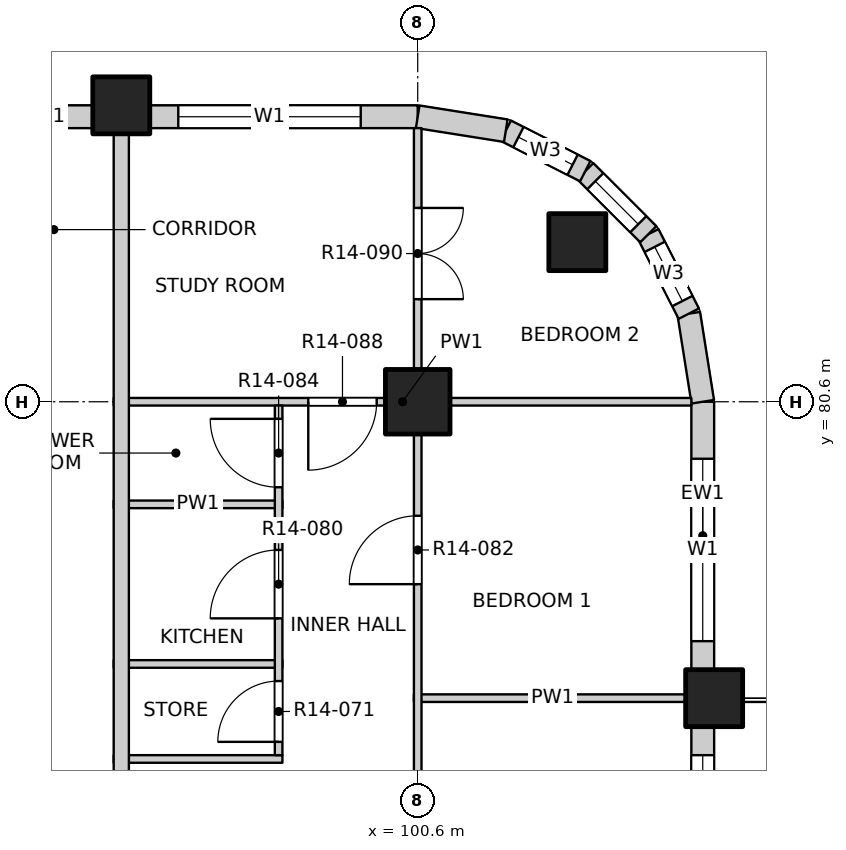
"""IFC4 building model, lengths in metres.
Left out: names, types, materials, properties, quantities, classifications, styles, units other than length and angle.
Written with IfcOpenShell. Run it as: python <this file> out.ifc"""

import sys

from ifc_helpers import new_model, si_unit, direction, frame, frame_2d, origin, origin_2d, place, context, subcontext, project, spatial, rectangle, extrude, element, fill, save


model = new_model("IFC4")
c1 = context("Model", 3, precision=1e-05, world=origin(), true_north=direction((0.0, 1.0)))
c2 = subcontext(c1, "Body", "Model", "MODEL_VIEW")
j1 = project(units=[si_unit("LENGTHUNIT", "METRE"), si_unit("PLANEANGLEUNIT", "RADIAN")], contexts=[c1])
p1 = place(None, origin())
s1 = spatial("IfcSite", under=j1, at=p1, CompositionType="ELEMENT")
p2 = place(p1, origin())
s2 = spatial("IfcBuilding", under=s1, at=p2, CompositionType="ELEMENT")
p3 = place(p2, frame((0.0, 0.0, 155.4)))
s3 = spatial("IfcBuildingStorey", under=s2, at=p3, CompositionType="ELEMENT", Elevation=155.4)
for number, where, z_axis, x_axis in (
    (1, (102.7, 82.7, -0.25), (0.0, 0.0, 1.0), (1.0, 0.0, 0.0)),
    (2, (104.5, 76.7, -0.25), (0.0, 0.0, 1.0), (1.0, 0.0, 0.0)),
    (3, (96.7, 84.5, -0.25), (0.0, 0.0, 1.0), (1.0, 0.0, 0.0)),
):
    element("IfcColumn", number, at=place(p3, frame(where, z_axis=z_axis, x_axis=x_axis)), inside=s3, PredefinedType="COLUMN", context=c2, shape_type="SweptSolid", body=[
        extrude(rectangle(XDim=0.75, YDim=0.75, at=origin_2d()), origin(), (0.0, 0.0, 1.0), 3.4),
    ])
p4 = place(p3, frame((100.6, 80.6, -0.25), z_axis=(0.0, 0.0, 1.0), x_axis=(1.0, 0.0, 0.0)))
e4 = element("IfcColumn", 4, at=p4, inside=s3, PredefinedType="COLUMN", context=c2, shape_type="SweptSolid", body=[
    extrude(rectangle(XDim=0.85, YDim=0.85, at=origin_2d()), origin(), (0.0, 0.0, 1.0), 3.4),
])
p5 = place(p3, frame((104.35, 69.275, 0.0), z_axis=(0.0, 0.0, 1.0), x_axis=(0.0, 1.0, 0.0)))
e5 = element("IfcWall", 5, at=p5, inside=s3, PredefinedType="SOLIDWALL", context=c2, shape_type="SweptSolid", body=[
    extrude(rectangle(XDim=7.05, YDim=0.3, at=frame_2d((3.525, 0.0))), origin(), (0.0, 0.0, 1.0), 2.7),
])
p6 = place(p5, frame((0.675, 0.0, 0.0)))
e6 = element("IfcOpeningElement", 6, at=p6, cuts=e5, PredefinedType="OPENING", context=c2, shape_type="SweptSolid", body=[
    extrude(rectangle(XDim=1.8, YDim=2.4, at=frame_2d((0.9, 1.2))), frame((0.0, 0.16, 0.0), z_axis=(0.0, -1.0, 0.0), x_axis=(1.0, 0.0, 0.0)), (0.0, 0.0, 1.0), 0.32),
])
p7 = place(p5, frame((4.275, 0.0, 0.9)))
e7 = element("IfcOpeningElement", 7, at=p7, cuts=e5, PredefinedType="OPENING", context=c2, shape_type="SweptSolid", body=[
    extrude(rectangle(XDim=2.4, YDim=1.8, at=frame_2d((1.2, 0.9))), frame((0.0, 0.16, 0.0), z_axis=(0.0, -1.0, 0.0), x_axis=(1.0, 0.0, 0.0)), (0.0, 0.0, 1.0), 0.32),
])
p8 = place(p3, frame((104.35, 77.075, 0.0), z_axis=(0.0, 0.0, 1.0), x_axis=(0.0, 1.0, 0.0)))
e8 = element("IfcWall", 8, at=p8, inside=s3, PredefinedType="SOLIDWALL", context=c2, shape_type="SweptSolid", body=[
    extrude(rectangle(XDim=3.525, YDim=0.3, at=frame_2d((1.763, 0.0))), origin(), (0.0, 0.0, 1.0), 2.7),
])
p9 = place(p8, frame((0.375, 0.0, 0.9)))
e9 = element("IfcOpeningElement", 9, at=p9, cuts=e8, PredefinedType="OPENING", context=c2, shape_type="SweptSolid", body=[
    extrude(rectangle(XDim=2.4, YDim=1.8, at=frame_2d((1.2, 0.9))), frame((0.0, 0.16, 0.0), z_axis=(0.0, -1.0, 0.0), x_axis=(1.0, 0.0, 0.0)), (0.0, 0.0, 1.0), 0.32),
])
p10 = place(p3, frame((95.025, 84.35, 0.0), z_axis=(0.0, 0.0, 1.0), x_axis=(1.0, 0.0, 0.0)))
e10 = element("IfcWall", 10, at=p10, inside=s3, PredefinedType="SOLIDWALL", context=c2, shape_type="SweptSolid", body=[
    extrude(rectangle(XDim=1.3, YDim=0.3, at=frame_2d((0.65, 0.0))), origin(), (0.0, 0.0, 1.0), 2.7),
])
p11 = place(p3, frame((97.075, 84.35, 0.0), z_axis=(0.0, 0.0, 1.0), x_axis=(1.0, 0.0, 0.0)))
e11 = element("IfcWall", 11, at=p11, inside=s3, PredefinedType="SOLIDWALL", context=c2, shape_type="SweptSolid", body=[
    extrude(rectangle(XDim=3.525, YDim=0.3, at=frame_2d((1.763, 0.0))), origin(), (0.0, 0.0, 1.0), 2.7),
])
p12 = place(p11, frame((0.375, 0.0, 0.9)))
e12 = element("IfcOpeningElement", 12, at=p12, cuts=e11, PredefinedType="OPENING", context=c2, shape_type="SweptSolid", body=[
    extrude(rectangle(XDim=2.4, YDim=1.8, at=frame_2d((1.2, 0.9))), frame((0.0, 0.16, 0.0), z_axis=(0.0, -1.0, 0.0), x_axis=(1.0, 0.0, 0.0)), (0.0, 0.0, 1.0), 0.32),
])
p13 = place(p3, frame((104.35, 80.6, 0.0), z_axis=(0.0, 0.0, 1.0), x_axis=(-0.156496880861, 0.987678452879, 0.0)))
e13 = element("IfcWall", 13, at=p13, inside=s3, PredefinedType="SOLIDWALL", context=c2, shape_type="SweptSolid", body=[
    extrude(rectangle(XDim=1.173, YDim=0.3, at=frame_2d((0.586, 0.0))), origin(), (0.0, 0.0, 1.0), 2.7),
])
p14 = place(p3, frame((104.167, 81.759, 0.0), z_axis=(0.0, 0.0, 1.0), x_axis=(-0.454025524128, 0.890988677504, 0.0)))
e14 = element("IfcWall", 14, at=p14, inside=s3, PredefinedType="SOLIDWALL", context=c2, shape_type="SweptSolid", body=[
    extrude(rectangle(XDim=1.173, YDim=0.3, at=frame_2d((0.587, 0.0))), origin(), (0.0, 0.0, 1.0), 2.7),
])
p15 = place(p14, frame((0.187, 0.0, 0.9)))
e15 = element("IfcOpeningElement", 15, at=p15, cuts=e14, PredefinedType="OPENING", context=c2, shape_type="SweptSolid", body=[
    extrude(rectangle(XDim=0.8, YDim=1.2, at=frame_2d((0.4, 0.6))), frame((0.0, 0.16, 0.0), z_axis=(0.0, -1.0, 0.0), x_axis=(1.0, 0.0, 0.0)), (0.0, 0.0, 1.0), 0.32),
])
p16 = place(p3, frame((103.634, 82.804, 0.0), z_axis=(0.0, 0.0, 1.0), x_axis=(-0.707106781187, 0.707106781187, 0.0)))
e16 = element("IfcWall", 16, at=p16, inside=s3, PredefinedType="SOLIDWALL", context=c2, shape_type="SweptSolid", body=[
    extrude(rectangle(XDim=1.173, YDim=0.3, at=frame_2d((0.586, 0.0))), origin(), (0.0, 0.0, 1.0), 2.7),
])
p17 = place(p16, frame((0.187, 0.0, 0.9)))
e17 = element("IfcOpeningElement", 17, at=p17, cuts=e16, PredefinedType="OPENING", context=c2, shape_type="SweptSolid", body=[
    extrude(rectangle(XDim=0.8, YDim=1.2, at=frame_2d((0.4, 0.6))), frame((0.0, 0.16, 0.0), z_axis=(0.0, -1.0, 0.0), x_axis=(1.0, 0.0, 0.0)), (0.0, 0.0, 1.0), 0.32),
])
p18 = place(p3, frame((102.804, 83.634, 0.0), z_axis=(0.0, 0.0, 1.0), x_axis=(-0.890988677504, 0.454025524128, 0.0)))
e18 = element("IfcWall", 18, at=p18, inside=s3, PredefinedType="SOLIDWALL", context=c2, shape_type="SweptSolid", body=[
    extrude(rectangle(XDim=1.173, YDim=0.3, at=frame_2d((0.587, 0.0))), origin(), (0.0, 0.0, 1.0), 2.7),
])
p19 = place(p18, frame((0.187, 0.0, 0.9)))
e19 = element("IfcOpeningElement", 19, at=p19, cuts=e18, PredefinedType="OPENING", context=c2, shape_type="SweptSolid", body=[
    extrude(rectangle(XDim=0.8, YDim=1.2, at=frame_2d((0.4, 0.6))), frame((0.0, 0.16, 0.0), z_axis=(0.0, -1.0, 0.0), x_axis=(1.0, 0.0, 0.0)), (0.0, 0.0, 1.0), 0.32),
])
p20 = place(p3, frame((101.759, 84.167, 0.0), z_axis=(0.0, 0.0, 1.0), x_axis=(-0.987678452879, 0.156496880861, 0.0)))
e20 = element("IfcWall", 20, at=p20, inside=s3, PredefinedType="SOLIDWALL", context=c2, shape_type="SweptSolid", body=[
    extrude(rectangle(XDim=1.173, YDim=0.3, at=frame_2d((0.586, 0.0))), origin(), (0.0, 0.0, 1.0), 2.7),
])
p21 = place(p3, frame((96.6, 75.9, 0.0), z_axis=(0.0, 0.0, 1.0), x_axis=(1.0, 0.0, 0.0)))
e21 = element("IfcWall", 21, at=p21, inside=s3, PredefinedType="PARTITIONING", context=c2, shape_type="SweptSolid", body=[
    extrude(rectangle(XDim=2.22, YDim=0.1, at=frame_2d((1.11, 0.0))), origin(), (0.0, 0.0, 1.0), 3.15),
])
p22 = place(p3, frame((100.55, 76.7, 0.0), z_axis=(0.0, 0.0, 1.0), x_axis=(1.0, 0.0, 0.0)))
e22 = element("IfcWall", 22, at=p22, inside=s3, PredefinedType="PARTITIONING", context=c2, shape_type="SweptSolid", body=[
    extrude(rectangle(XDim=3.65, YDim=0.1, at=frame_2d((1.825, 0.0))), origin(), (0.0, 0.0, 1.0), 2.55),
])
for number, where, z_axis, x_axis in (
    (23, (96.6, 77.15, 0.0), (0.0, 0.0, 1.0), (1.0, 0.0, 0.0)),
    (24, (96.6, 79.25, 0.0), (0.0, 0.0, 1.0), (1.0, 0.0, 0.0)),
):
    element("IfcWall", number, at=place(p3, frame(where, z_axis=z_axis, x_axis=x_axis)), inside=s3, PredefinedType="PARTITIONING", context=c2, shape_type="SweptSolid", body=[
        extrude(rectangle(XDim=2.22, YDim=0.1, at=frame_2d((1.11, 0.0))), origin(), (0.0, 0.0, 1.0), 3.15),
    ])
p23 = place(p3, frame((96.6, 80.6, 0.0), z_axis=(0.0, 0.0, 1.0), x_axis=(1.0, 0.0, 0.0)))
e25 = element("IfcWall", 25, at=p23, inside=s3, PredefinedType="PARTITIONING", context=c2, shape_type="SweptSolid", body=[
    extrude(rectangle(XDim=7.6, YDim=0.1, at=frame_2d((3.8, 0.0))), origin(), (0.0, 0.0, 1.0), 3.15),
])
p24 = place(p23, frame((2.56, 0.0, 0.0)))
e26 = element("IfcOpeningElement", 26, at=p24, cuts=e25, PredefinedType="OPENING", context=c2, shape_type="SweptSolid", body=[
    extrude(rectangle(XDim=0.9, YDim=2.1, at=frame_2d((0.45, 1.05))), frame((0.0, 0.06, 0.0), z_axis=(0.0, -1.0, 0.0), x_axis=(1.0, 0.0, 0.0)), (0.0, 0.0, 1.0), 0.12),
])
p25 = place(p3, frame((96.7, 49.5, 0.0), z_axis=(0.0, 0.0, 1.0), x_axis=(0.0, 1.0, 0.0)))
e27 = element("IfcWall", 27, at=p25, inside=s3, PredefinedType="PARTITIONING", context=c2, shape_type="SweptSolid", body=[
    extrude(rectangle(XDim=34.7, YDim=0.2, at=frame_2d((17.35, 0.0))), origin(), (0.0, 0.0, 1.0), 3.15),
])
p26 = place(p25, frame((3.225, 0.0, 0.0)))
e28 = element("IfcOpeningElement", 28, at=p26, cuts=e27, PredefinedType="OPENING", context=c2, shape_type="SweptSolid", body=[
    extrude(rectangle(XDim=1.0, YDim=2.1, at=frame_2d((0.5, 1.05))), frame((0.0, 0.11, 0.0), z_axis=(0.0, -1.0, 0.0), x_axis=(1.0, 0.0, 0.0)), (0.0, 0.0, 1.0), 0.22),
])
p27 = place(p25, frame((19.775, 0.0, 0.0)))
e29 = element("IfcOpeningElement", 29, at=p27, cuts=e27, PredefinedType="OPENING", context=c2, shape_type="SweptSolid", body=[
    extrude(rectangle(XDim=1.0, YDim=2.1, at=frame_2d((0.5, 1.05))), frame((0.0, 0.11, 0.0), z_axis=(0.0, -1.0, 0.0), x_axis=(1.0, 0.0, 0.0)), (0.0, 0.0, 1.0), 0.22),
])
p28 = place(p25, frame((24.125, 0.0, 0.0)))
e30 = element("IfcOpeningElement", 30, at=p28, cuts=e27, PredefinedType="OPENING", context=c2, shape_type="SweptSolid", body=[
    extrude(rectangle(XDim=1.0, YDim=2.1, at=frame_2d((0.5, 1.05))), frame((0.0, 0.11, 0.0), z_axis=(0.0, -1.0, 0.0), x_axis=(1.0, 0.0, 0.0)), (0.0, 0.0, 1.0), 0.22),
])
p29 = place(p3, frame((98.77, 75.95, 0.0), z_axis=(0.0, 0.0, 1.0), x_axis=(0.0, 1.0, 0.0)))
e31 = element("IfcWall", 31, at=p29, inside=s3, PredefinedType="PARTITIONING", context=c2, shape_type="SweptSolid", body=[
    extrude(rectangle(XDim=4.6, YDim=0.1, at=frame_2d((2.3, 0.0))), origin(), (0.0, 0.0, 1.0), 3.15),
])
p30 = place(p29, frame((0.175, 0.0, 0.0)))
e32 = element("IfcOpeningElement", 32, at=p30, cuts=e31, PredefinedType="OPENING", context=c2, shape_type="SweptSolid", body=[
    extrude(rectangle(XDim=0.8, YDim=2.1, at=frame_2d((0.4, 1.05))), frame((0.0, 0.06, 0.0), z_axis=(0.0, -1.0, 0.0), x_axis=(1.0, 0.0, 0.0)), (0.0, 0.0, 1.0), 0.12),
])
p31 = place(p29, frame((1.8, 0.0, 0.0)))
e33 = element("IfcOpeningElement", 33, at=p31, cuts=e31, PredefinedType="OPENING", context=c2, shape_type="SweptSolid", body=[
    extrude(rectangle(XDim=0.9, YDim=2.1, at=frame_2d((0.45, 1.05))), frame((0.0, 0.06, 0.0), z_axis=(0.0, -1.0, 0.0), x_axis=(1.0, 0.0, 0.0)), (0.0, 0.0, 1.0), 0.12),
])
p32 = place(p29, frame((3.525, 0.0, 0.0)))
e34 = element("IfcOpeningElement", 34, at=p32, cuts=e31, PredefinedType="OPENING", context=c2, shape_type="SweptSolid", body=[
    extrude(rectangle(XDim=0.9, YDim=2.1, at=frame_2d((0.45, 1.05))), frame((0.0, 0.06, 0.0), z_axis=(0.0, -1.0, 0.0), x_axis=(1.0, 0.0, 0.0)), (0.0, 0.0, 1.0), 0.12),
])
p33 = place(p3, frame((100.6, 45.8, 0.0), z_axis=(0.0, 0.0, 1.0), x_axis=(0.0, 1.0, 0.0)))
e35 = element("IfcWall", 35, at=p33, inside=s3, PredefinedType="PARTITIONING", context=c2, shape_type="SweptSolid", body=[
    extrude(rectangle(XDim=38.4, YDim=0.1, at=frame_2d((19.2, 0.0))), origin(), (0.0, 0.0, 1.0), 3.15),
])
p34 = place(p33, frame((1.05, 0.0, 0.0)))
e36 = element("IfcOpeningElement", 36, at=p34, cuts=e35, PredefinedType="OPENING", context=c2, shape_type="SweptSolid", body=[
    extrude(rectangle(XDim=1.2, YDim=2.1, at=frame_2d((0.6, 1.05))), frame((0.0, 0.06, 0.0), z_axis=(0.0, -1.0, 0.0), x_axis=(1.0, 0.0, 0.0)), (0.0, 0.0, 1.0), 0.12),
])
p35 = place(p33, frame((5.1, 0.0, 0.0)))
e37 = element("IfcOpeningElement", 37, at=p35, cuts=e35, PredefinedType="OPENING", context=c2, shape_type="SweptSolid", body=[
    extrude(rectangle(XDim=0.9, YDim=2.1, at=frame_2d((0.45, 1.05))), frame((0.0, 0.06, 0.0), z_axis=(0.0, -1.0, 0.0), x_axis=(1.0, 0.0, 0.0)), (0.0, 0.0, 1.0), 0.12),
])
p36 = place(p33, frame((9.0, 0.0, 0.0)))
e38 = element("IfcOpeningElement", 38, at=p36, cuts=e35, PredefinedType="OPENING", context=c2, shape_type="SweptSolid", body=[
    extrude(rectangle(XDim=0.9, YDim=2.1, at=frame_2d((0.45, 1.05))), frame((0.0, 0.06, 0.0), z_axis=(0.0, -1.0, 0.0), x_axis=(1.0, 0.0, 0.0)), (0.0, 0.0, 1.0), 0.12),
])
p37 = place(p33, frame((12.9, 0.0, 0.0)))
e39 = element("IfcOpeningElement", 39, at=p37, cuts=e35, PredefinedType="OPENING", context=c2, shape_type="SweptSolid", body=[
    extrude(rectangle(XDim=0.9, YDim=2.1, at=frame_2d((0.45, 1.05))), frame((0.0, 0.06, 0.0), z_axis=(0.0, -1.0, 0.0), x_axis=(1.0, 0.0, 0.0)), (0.0, 0.0, 1.0), 0.12),
])
p38 = place(p33, frame((16.8, 0.0, 0.0)))
e40 = element("IfcOpeningElement", 40, at=p38, cuts=e35, PredefinedType="OPENING", context=c2, shape_type="SweptSolid", body=[
    extrude(rectangle(XDim=0.9, YDim=2.1, at=frame_2d((0.45, 1.05))), frame((0.0, 0.06, 0.0), z_axis=(0.0, -1.0, 0.0), x_axis=(1.0, 0.0, 0.0)), (0.0, 0.0, 1.0), 0.12),
])
p39 = place(p33, frame((20.7, 0.0, 0.0)))
e41 = element("IfcOpeningElement", 41, at=p39, cuts=e35, PredefinedType="OPENING", context=c2, shape_type="SweptSolid", body=[
    extrude(rectangle(XDim=0.9, YDim=2.1, at=frame_2d((0.45, 1.05))), frame((0.0, 0.06, 0.0), z_axis=(0.0, -1.0, 0.0), x_axis=(1.0, 0.0, 0.0)), (0.0, 0.0, 1.0), 0.12),
])
p40 = place(p33, frame((24.6, 0.0, 0.0)))
e42 = element("IfcOpeningElement", 42, at=p40, cuts=e35, PredefinedType="OPENING", context=c2, shape_type="SweptSolid", body=[
    extrude(rectangle(XDim=0.9, YDim=2.1, at=frame_2d((0.45, 1.05))), frame((0.0, 0.06, 0.0), z_axis=(0.0, -1.0, 0.0), x_axis=(1.0, 0.0, 0.0)), (0.0, 0.0, 1.0), 0.12),
])
p41 = place(p33, frame((28.5, 0.0, 0.0)))
e43 = element("IfcOpeningElement", 43, at=p41, cuts=e35, PredefinedType="OPENING", context=c2, shape_type="SweptSolid", body=[
    extrude(rectangle(XDim=0.9, YDim=2.1, at=frame_2d((0.45, 1.05))), frame((0.0, 0.06, 0.0), z_axis=(0.0, -1.0, 0.0), x_axis=(1.0, 0.0, 0.0)), (0.0, 0.0, 1.0), 0.12),
])
p42 = place(p33, frame((32.4, 0.0, 0.0)))
e44 = element("IfcOpeningElement", 44, at=p42, cuts=e35, PredefinedType="OPENING", context=c2, shape_type="SweptSolid", body=[
    extrude(rectangle(XDim=0.9, YDim=2.1, at=frame_2d((0.45, 1.05))), frame((0.0, 0.06, 0.0), z_axis=(0.0, -1.0, 0.0), x_axis=(1.0, 0.0, 0.0)), (0.0, 0.0, 1.0), 0.12),
])
p43 = place(p33, frame((36.15, 0.0, 0.0)))
e45 = element("IfcOpeningElement", 45, at=p43, cuts=e35, PredefinedType="OPENING", context=c2, shape_type="SweptSolid", body=[
    extrude(rectangle(XDim=1.2, YDim=2.1, at=frame_2d((0.6, 1.05))), frame((0.0, 0.06, 0.0), z_axis=(0.0, -1.0, 0.0), x_axis=(1.0, 0.0, 0.0)), (0.0, 0.0, 1.0), 0.12),
])
p44 = place(p7, origin())
e46 = element("IfcWindow", 46, at=p44, inside=s3, PartitioningType="DOUBLE_PANEL_VERTICAL", PredefinedType="WINDOW", context=c2, shape_type="SweptSolid", body=[
    extrude(rectangle(XDim=2.4, YDim=1.8, at=frame_2d((1.2, 0.9))), frame((0.0, 0.03, 0.0), z_axis=(0.0, -1.0, 0.0), x_axis=(1.0, 0.0, 0.0)), (0.0, 0.0, 1.0), 0.06),
])
fill(e7, e46)
p45 = place(p9, origin())
e47 = element("IfcWindow", 47, at=p45, inside=s3, PartitioningType="DOUBLE_PANEL_VERTICAL", PredefinedType="WINDOW", context=c2, shape_type="SweptSolid", body=[
    extrude(rectangle(XDim=2.4, YDim=1.8, at=frame_2d((1.2, 0.9))), frame((0.0, 0.03, 0.0), z_axis=(0.0, -1.0, 0.0), x_axis=(1.0, 0.0, 0.0)), (0.0, 0.0, 1.0), 0.06),
])
fill(e9, e47)
p46 = place(p12, origin())
e48 = element("IfcWindow", 48, at=p46, inside=s3, PartitioningType="DOUBLE_PANEL_VERTICAL", PredefinedType="WINDOW", context=c2, shape_type="SweptSolid", body=[
    extrude(rectangle(XDim=2.4, YDim=1.8, at=frame_2d((1.2, 0.9))), frame((0.0, 0.03, 0.0), z_axis=(0.0, -1.0, 0.0), x_axis=(1.0, 0.0, 0.0)), (0.0, 0.0, 1.0), 0.06),
])
fill(e12, e48)
p47 = place(p15, origin())
e49 = element("IfcWindow", 49, at=p47, inside=s3, PartitioningType="SINGLE_PANEL", PredefinedType="WINDOW", context=c2, shape_type="SweptSolid", body=[
    extrude(rectangle(XDim=0.8, YDim=1.2, at=frame_2d((0.4, 0.6))), frame((0.0, 0.03, 0.0), z_axis=(0.0, -1.0, 0.0), x_axis=(1.0, 0.0, 0.0)), (0.0, 0.0, 1.0), 0.06),
])
fill(e15, e49)
p48 = place(p17, origin())
e50 = element("IfcWindow", 50, at=p48, inside=s3, PartitioningType="SINGLE_PANEL", PredefinedType="WINDOW", context=c2, shape_type="SweptSolid", body=[
    extrude(rectangle(XDim=0.8, YDim=1.2, at=frame_2d((0.4, 0.6))), frame((0.0, 0.03, 0.0), z_axis=(0.0, -1.0, 0.0), x_axis=(1.0, 0.0, 0.0)), (0.0, 0.0, 1.0), 0.06),
])
fill(e17, e50)
p49 = place(p19, origin())
e51 = element("IfcWindow", 51, at=p49, inside=s3, PartitioningType="SINGLE_PANEL", PredefinedType="WINDOW", context=c2, shape_type="SweptSolid", body=[
    extrude(rectangle(XDim=0.8, YDim=1.2, at=frame_2d((0.4, 0.6))), frame((0.0, 0.03, 0.0), z_axis=(0.0, -1.0, 0.0), x_axis=(1.0, 0.0, 0.0)), (0.0, 0.0, 1.0), 0.06),
])
fill(e19, e51)
p50 = place(p30, origin())
e52 = element("IfcDoor", 52, at=p50, inside=s3, OperationType="SINGLE_SWING_LEFT", PredefinedType="DOOR", context=c2, shape_type="SweptSolid", body=[
    extrude(rectangle(XDim=0.8, YDim=2.1, at=frame_2d((0.4, 1.05))), frame((0.0, 0.025, 0.0), z_axis=(0.0, -1.0, 0.0), x_axis=(1.0, 0.0, 0.0)), (0.0, 0.0, 1.0), 0.05),
])
fill(e32, e52)
p51 = place(p31, origin())
e53 = element("IfcDoor", 53, at=p51, inside=s3, OperationType="SINGLE_SWING_LEFT", PredefinedType="DOOR", context=c2, shape_type="SweptSolid", body=[
    extrude(rectangle(XDim=0.9, YDim=2.1, at=frame_2d((0.45, 1.05))), frame((0.0, 0.025, 0.0), z_axis=(0.0, -1.0, 0.0), x_axis=(1.0, 0.0, 0.0)), (0.0, 0.0, 1.0), 0.05),
])
fill(e33, e53)
p52 = place(p42, origin())
e54 = element("IfcDoor", 54, at=p52, inside=s3, OperationType="SINGLE_SWING_LEFT", PredefinedType="DOOR", context=c2, shape_type="SweptSolid", body=[
    extrude(rectangle(XDim=0.9, YDim=2.1, at=frame_2d((0.45, 1.05))), frame((0.0, 0.025, 0.0), z_axis=(0.0, -1.0, 0.0), x_axis=(1.0, 0.0, 0.0)), (0.0, 0.0, 1.0), 0.05),
])
fill(e44, e54)
p53 = place(p32, origin())
e55 = element("IfcDoor", 55, at=p53, inside=s3, OperationType="SINGLE_SWING_RIGHT", PredefinedType="DOOR", context=c2, shape_type="SweptSolid", body=[
    extrude(rectangle(XDim=0.9, YDim=2.1, at=frame_2d((0.45, 1.05))), frame((0.0, 0.025, 0.0), z_axis=(0.0, -1.0, 0.0), x_axis=(1.0, 0.0, 0.0)), (0.0, 0.0, 1.0), 0.05),
])
fill(e34, e55)
p54 = place(p24, origin())
e56 = element("IfcDoor", 56, at=p54, inside=s3, OperationType="SINGLE_SWING_RIGHT", PredefinedType="DOOR", context=c2, shape_type="SweptSolid", body=[
    extrude(rectangle(XDim=0.9, YDim=2.1, at=frame_2d((0.45, 1.05))), frame((0.0, 0.025, 0.0), z_axis=(0.0, -1.0, 0.0), x_axis=(1.0, 0.0, 0.0)), (0.0, 0.0, 1.0), 0.05),
])
fill(e26, e56)
p55 = place(p43, origin())
e57 = element("IfcDoor", 57, at=p55, inside=s3, OperationType="DOUBLE_DOOR_SINGLE_SWING", PredefinedType="DOOR", context=c2, shape_type="SweptSolid", body=[
    extrude(rectangle(XDim=1.2, YDim=2.1, at=frame_2d((0.6, 1.05))), frame((0.0, 0.025, 0.0), z_axis=(0.0, -1.0, 0.0), x_axis=(1.0, 0.0, 0.0)), (0.0, 0.0, 1.0), 0.05),
])
fill(e45, e57)
save(model, sys.argv[1])
